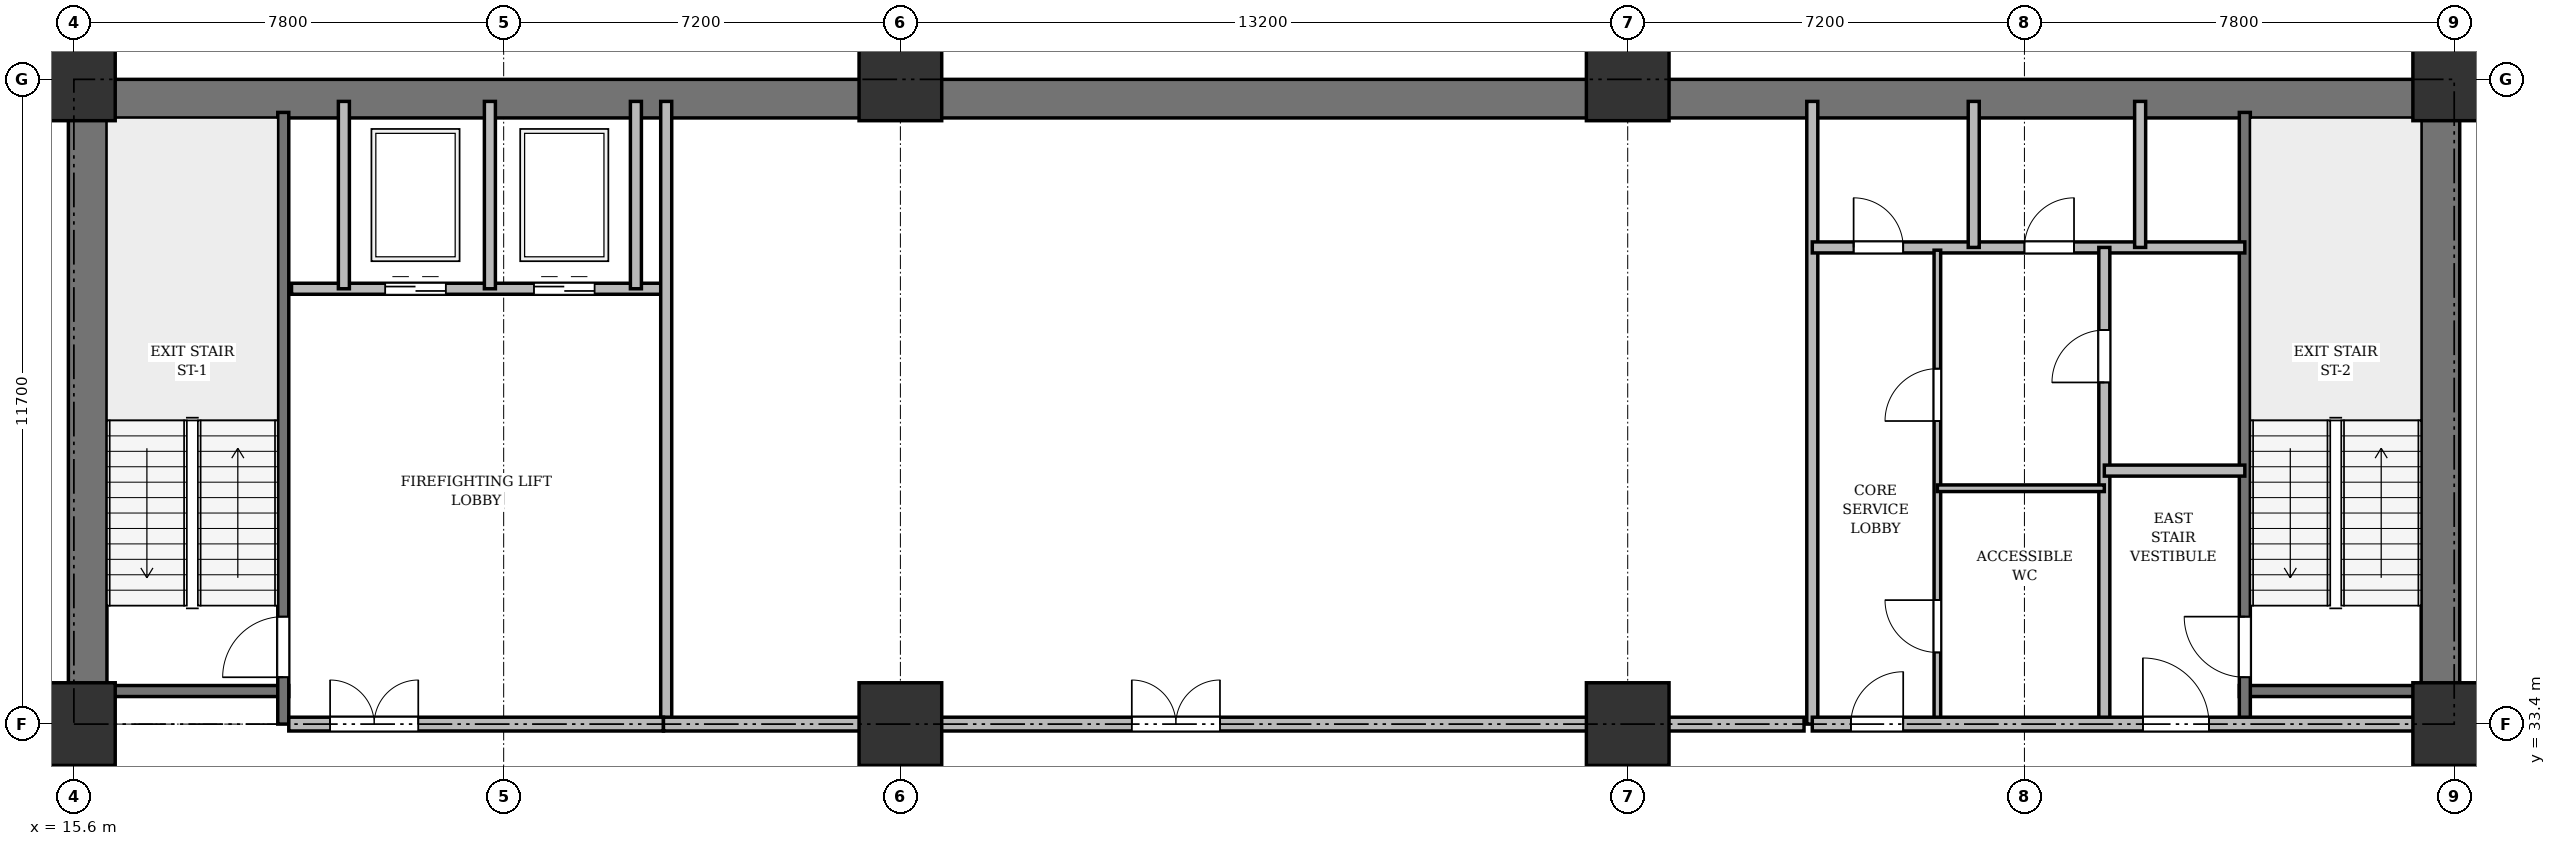
"""IFC4 building model, lengths in metres.
Left out: names, types, materials, properties, quantities, classifications, styles, units other than length and angle.
Written with IfcOpenShell. Run it as: python <this file> out.ifc"""

import sys

from ifc_helpers import new_model, si_unit, direction, frame, frame_2d, origin, origin_2d, place, context, subcontext, project, spatial, rectangle, extrude, source, transform, mapped, element, fill, save


model = new_model("IFC4")
c1 = context("Model", 3, precision=1e-05, world=origin(), true_north=direction((0.0, 1.0)))
c2 = subcontext(c1, "Body", "Model", "MODEL_VIEW")
j1 = project(units=[si_unit("LENGTHUNIT", "METRE"), si_unit("PLANEANGLEUNIT", "RADIAN")], contexts=[c1])
p1 = place(None, origin())
s1 = spatial("IfcSite", under=j1, at=p1, CompositionType="ELEMENT")
p2 = place(p1, origin())
s2 = spatial("IfcBuilding", under=s1, at=p2, CompositionType="ELEMENT")
p3 = place(p2, frame((0.0, 0.0, -13.2)))
s3 = spatial("IfcBuildingStorey", under=s2, at=p3, CompositionType="ELEMENT", Elevation=-13.2)
m1 = source(origin(), c2, "Body", "SweptSolid", [
    extrude(rectangle(XDim=1.5, YDim=1.5, at=origin_2d()), origin(), (0.0, 0.0, 1.0), 4.6),
])
for number, where, z_axis, x_axis in (
    (1, (15.6, 33.4, 0.0), (0.0, 0.0, 1.0), (1.0, 0.0, 0.0)),
    (2, (15.6, 45.1, 0.0), (0.0, 0.0, 1.0), (1.0, 0.0, 0.0)),
    (3, (30.6, 33.4, 0.0), (0.0, 0.0, 1.0), (1.0, 0.0, 0.0)),
    (4, (30.6, 45.1, 0.0), (0.0, 0.0, 1.0), (1.0, 0.0, 0.0)),
    (5, (43.8, 33.4, 0.0), (0.0, 0.0, 1.0), (1.0, 0.0, 0.0)),
    (6, (43.8, 45.1, 0.0), (0.0, 0.0, 1.0), (1.0, 0.0, 0.0)),
    (7, (58.8, 33.4, 0.0), (0.0, 0.0, 1.0), (1.0, 0.0, 0.0)),
    (8, (58.8, 45.1, 0.0), (0.0, 0.0, 1.0), (1.0, 0.0, 0.0)),
):
    element("IfcColumn", number, at=place(p3, frame(where, z_axis=z_axis, x_axis=x_axis)), inside=s3, PredefinedType="COLUMN", context=c2, shape_type="MappedRepresentation", body=[
        mapped(m1, transform((0.0, 0.0, 0.0), x_axis=(1.0, 0.0, 0.0), y_axis=(0.0, 1.0, 0.0), z_axis=(0.0, 0.0, 1.0), scale=1.0)),
    ])
p4 = place(p3, frame((15.5, 44.75, 0.0), z_axis=(0.0, 0.0, 1.0), x_axis=(1.0, 0.0, 0.0)))
e9 = element("IfcWall", 9, at=p4, inside=s3, PredefinedType="SHEAR", context=c2, shape_type="SweptSolid", body=[
    extrude(rectangle(XDim=43.4, YDim=0.7, at=frame_2d((21.7, 0.0))), origin(), (0.0, 0.0, 1.0), 4.28),
])
for number, where, z_axis, x_axis in (
    (10, (15.85, 33.4, 0.0), (0.0, 0.0, 1.0), (0.0, 1.0, 0.0)),
    (11, (58.55, 33.4, 0.0), (0.0, 0.0, 1.0), (0.0, 1.0, 0.0)),
):
    element("IfcWall", number, at=place(p3, frame(where, z_axis=z_axis, x_axis=x_axis)), inside=s3, PredefinedType="SHEAR", context=c2, shape_type="SweptSolid", body=[
        extrude(rectangle(XDim=11.7, YDim=0.7, at=frame_2d((5.85, 0.0))), origin(), (0.0, 0.0, 1.0), 4.28),
    ])
p5 = place(p3, frame((16.1, 34.0, 0.0), z_axis=(0.0, 0.0, 1.0), x_axis=(1.0, 0.0, 0.0)))
e12 = element("IfcWall", 12, at=p5, inside=s3, PredefinedType="SHEAR", context=c2, shape_type="SweptSolid", body=[
    extrude(rectangle(XDim=3.4, YDim=0.2, at=frame_2d((1.7, 0.0))), origin(), (0.0, 0.0, 1.0), 4.28),
])
p6 = place(p3, frame((19.4, 33.4, 0.0), z_axis=(0.0, 0.0, 1.0), x_axis=(0.0, 1.0, 0.0)))
e13 = element("IfcWall", 13, at=p6, inside=s3, PredefinedType="SHEAR", context=c2, shape_type="SweptSolid", body=[
    extrude(rectangle(XDim=11.1, YDim=0.2, at=frame_2d((5.55, 0.0))), origin(), (0.0, 0.0, 1.0), 4.28),
])
p7 = place(p6, frame((0.85, 0.0, 0.0)))
e14 = element("IfcOpeningElement", 14, at=p7, cuts=e13, PredefinedType="OPENING", context=c2, shape_type="SweptSolid", body=[
    extrude(rectangle(XDim=1.1, YDim=2.15, at=frame_2d((0.55, 1.075))), frame((0.0, 0.11, 0.0), z_axis=(0.0, -1.0, 0.0), x_axis=(1.0, 0.0, 0.0)), (0.0, 0.0, 1.0), 0.22),
])
p8 = place(p3, frame((54.9, 34.0, 0.0), z_axis=(0.0, 0.0, 1.0), x_axis=(1.0, 0.0, 0.0)))
e15 = element("IfcWall", 15, at=p8, inside=s3, PredefinedType="SHEAR", context=c2, shape_type="SweptSolid", body=[
    extrude(rectangle(XDim=3.4, YDim=0.2, at=frame_2d((1.7, 0.0))), origin(), (0.0, 0.0, 1.0), 4.28),
])
p9 = place(p3, frame((55.0, 33.4, 0.0), z_axis=(0.0, 0.0, 1.0), x_axis=(0.0, 1.0, 0.0)))
e16 = element("IfcWall", 16, at=p9, inside=s3, PredefinedType="SHEAR", context=c2, shape_type="SweptSolid", body=[
    extrude(rectangle(XDim=11.1, YDim=0.2, at=frame_2d((5.55, 0.0))), origin(), (0.0, 0.0, 1.0), 4.28),
])
p10 = place(p9, frame((0.85, 0.0, 0.0)))
e17 = element("IfcOpeningElement", 17, at=p10, cuts=e16, PredefinedType="OPENING", context=c2, shape_type="SweptSolid", body=[
    extrude(rectangle(XDim=1.1, YDim=2.15, at=frame_2d((0.55, 1.075))), frame((0.0, 0.11, 0.0), z_axis=(0.0, -1.0, 0.0), x_axis=(1.0, 0.0, 0.0)), (0.0, 0.0, 1.0), 0.22),
])
p11 = place(p3, frame((19.55, 41.3, 0.0), z_axis=(0.0, 0.0, 1.0), x_axis=(1.0, 0.0, 0.0)))
e18 = element("IfcWall", 18, at=p11, inside=s3, PredefinedType="SOLIDWALL", context=c2, shape_type="SweptSolid", body=[
    extrude(rectangle(XDim=6.75, YDim=0.2, at=frame_2d((3.375, 0.0))), origin(), (0.0, 0.0, 1.0), 4.28),
])
p12 = place(p11, frame((1.7, 0.0, 0.0)))
e19 = element("IfcOpeningElement", 19, at=p12, cuts=e18, PredefinedType="OPENING", context=c2, shape_type="SweptSolid", body=[
    extrude(rectangle(XDim=1.1, YDim=2.15, at=frame_2d((0.55, 1.075))), frame((0.0, 0.11, 0.0), z_axis=(0.0, -1.0, 0.0), x_axis=(1.0, 0.0, 0.0)), (0.0, 0.0, 1.0), 0.22),
])
p13 = place(p11, frame((4.4, 0.0, 0.0)))
e20 = element("IfcOpeningElement", 20, at=p13, cuts=e18, PredefinedType="OPENING", context=c2, shape_type="SweptSolid", body=[
    extrude(rectangle(XDim=1.1, YDim=2.15, at=frame_2d((0.55, 1.075))), frame((0.0, 0.11, 0.0), z_axis=(0.0, -1.0, 0.0), x_axis=(1.0, 0.0, 0.0)), (0.0, 0.0, 1.0), 0.22),
])
for number, where, z_axis, x_axis in (
    (21, (20.5, 41.3, 0.0), (0.0, 0.0, 1.0), (0.0, 1.0, 0.0)),
    (22, (23.15, 41.3, 0.0), (0.0, 0.0, 1.0), (0.0, 1.0, 0.0)),
    (23, (25.8, 41.3, 0.0), (0.0, 0.0, 1.0), (0.0, 1.0, 0.0)),
):
    element("IfcWall", number, at=place(p3, frame(where, z_axis=z_axis, x_axis=x_axis)), inside=s3, PredefinedType="SOLIDWALL", context=c2, shape_type="SweptSolid", body=[
        extrude(rectangle(XDim=3.4, YDim=0.2, at=frame_2d((1.7, 0.0))), origin(), (0.0, 0.0, 1.0), 4.28),
    ])
p14 = place(p3, frame((26.35, 33.4, 0.0), z_axis=(0.0, 0.0, 1.0), x_axis=(0.0, 1.0, 0.0)))
e24 = element("IfcWall", 24, at=p14, inside=s3, PredefinedType="SOLIDWALL", context=c2, shape_type="SweptSolid", body=[
    extrude(rectangle(XDim=11.3, YDim=0.2, at=frame_2d((5.65, 0.0))), origin(), (0.0, 0.0, 1.0), 3.38),
])
p15 = place(p3, frame((19.5, 33.4, 0.0), z_axis=(0.0, 0.0, 1.0), x_axis=(1.0, 0.0, 0.0)))
e25 = element("IfcWall", 25, at=p15, inside=s3, PredefinedType="PARTITIONING", context=c2, shape_type="SweptSolid", body=[
    extrude(rectangle(XDim=6.8, YDim=0.25, at=frame_2d((3.4, 0.0))), origin(), (0.0, 0.0, 1.0), 3.38),
])
p16 = place(p15, frame((0.75, 0.0, 0.0)))
e26 = element("IfcOpeningElement", 26, at=p16, cuts=e25, PredefinedType="OPENING", context=c2, shape_type="SweptSolid", body=[
    extrude(rectangle(XDim=1.6, YDim=2.2, at=frame_2d((0.8, 1.1))), frame((0.0, 0.135, 0.0), z_axis=(0.0, -1.0, 0.0), x_axis=(1.0, 0.0, 0.0)), (0.0, 0.0, 1.0), 0.27),
])
p17 = place(p3, frame((47.15, 33.4, 0.0), z_axis=(0.0, 0.0, 1.0), x_axis=(0.0, 1.0, 0.0)))
e27 = element("IfcWall", 27, at=p17, inside=s3, PredefinedType="SOLIDWALL", context=c2, shape_type="SweptSolid", body=[
    extrude(rectangle(XDim=11.3, YDim=0.2, at=frame_2d((5.65, 0.0))), origin(), (0.0, 0.0, 1.0), 3.38),
])
p18 = place(p3, frame((26.3, 33.4, 0.0), z_axis=(0.0, 0.0, 1.0), x_axis=(1.0, 0.0, 0.0)))
e28 = element("IfcWall", 28, at=p18, inside=s3, PredefinedType="PARTITIONING", context=c2, shape_type="SweptSolid", body=[
    extrude(rectangle(XDim=20.7, YDim=0.25, at=frame_2d((10.35, 0.0))), origin(), (0.0, 0.0, 1.0), 3.38),
])
p19 = place(p18, frame((8.5, 0.0, 0.0)))
e29 = element("IfcOpeningElement", 29, at=p19, cuts=e28, PredefinedType="OPENING", context=c2, shape_type="SweptSolid", body=[
    extrude(rectangle(XDim=1.6, YDim=2.2, at=frame_2d((0.8, 1.1))), frame((0.0, 0.135, 0.0), z_axis=(0.0, -1.0, 0.0), x_axis=(1.0, 0.0, 0.0)), (0.0, 0.0, 1.0), 0.27),
])
p20 = place(p3, frame((47.15, 42.05, 0.0), z_axis=(0.0, 0.0, 1.0), x_axis=(1.0, 0.0, 0.0)))
e30 = element("IfcWall", 30, at=p20, inside=s3, PredefinedType="SOLIDWALL", context=c2, shape_type="SweptSolid", body=[
    extrude(rectangle(XDim=7.85, YDim=0.2, at=frame_2d((3.925, 0.0))), origin(), (0.0, 0.0, 1.0), 4.28),
])
p21 = place(p20, frame((0.75, 0.0, 0.0)))
e31 = element("IfcOpeningElement", 31, at=p21, cuts=e30, PredefinedType="OPENING", context=c2, shape_type="SweptSolid", body=[
    extrude(rectangle(XDim=0.9, YDim=2.1, at=frame_2d((0.45, 1.05))), frame((0.0, 0.11, 0.0), z_axis=(0.0, -1.0, 0.0), x_axis=(1.0, 0.0, 0.0)), (0.0, 0.0, 1.0), 0.22),
])
p22 = place(p20, frame((3.85, 0.0, 0.0)))
e32 = element("IfcOpeningElement", 32, at=p22, cuts=e30, PredefinedType="OPENING", context=c2, shape_type="SweptSolid", body=[
    extrude(rectangle(XDim=0.9, YDim=2.1, at=frame_2d((0.45, 1.05))), frame((0.0, 0.11, 0.0), z_axis=(0.0, -1.0, 0.0), x_axis=(1.0, 0.0, 0.0)), (0.0, 0.0, 1.0), 0.22),
])
for number, where, z_axis, x_axis in (
    (33, (50.08, 42.05, 0.0), (0.0, 0.0, 1.0), (0.0, 1.0, 0.0)),
    (34, (53.1, 42.05, 0.0), (0.0, 0.0, 1.0), (0.0, 1.0, 0.0)),
):
    element("IfcWall", number, at=place(p3, frame(where, z_axis=z_axis, x_axis=x_axis)), inside=s3, PredefinedType="SOLIDWALL", context=c2, shape_type="SweptSolid", body=[
        extrude(rectangle(XDim=2.65, YDim=0.2, at=frame_2d((1.325, 0.0))), origin(), (0.0, 0.0, 1.0), 4.28),
    ])
p23 = place(p3, frame((52.45, 33.4, 0.0), z_axis=(0.0, 0.0, 1.0), x_axis=(0.0, 1.0, 0.0)))
e35 = element("IfcWall", 35, at=p23, inside=s3, PredefinedType="PARTITIONING", context=c2, shape_type="SweptSolid", body=[
    extrude(rectangle(XDim=8.65, YDim=0.2, at=frame_2d((4.325, 0.0))), origin(), (0.0, 0.0, 1.0), 3.38),
])
p24 = place(p23, frame((6.2, 0.0, 0.0)))
e36 = element("IfcOpeningElement", 36, at=p24, cuts=e35, PredefinedType="OPENING", context=c2, shape_type="SweptSolid", body=[
    extrude(rectangle(XDim=0.95, YDim=2.15, at=frame_2d((0.475, 1.075))), frame((0.0, 0.11, 0.0), z_axis=(0.0, -1.0, 0.0), x_axis=(1.0, 0.0, 0.0)), (0.0, 0.0, 1.0), 0.22),
])
p25 = place(p3, frame((52.45, 38.0, 0.0), z_axis=(0.0, 0.0, 1.0), x_axis=(1.0, 0.0, 0.0)))
e37 = element("IfcWall", 37, at=p25, inside=s3, PredefinedType="PARTITIONING", context=c2, shape_type="SweptSolid", body=[
    extrude(rectangle(XDim=2.55, YDim=0.2, at=frame_2d((1.275, 0.0))), origin(), (0.0, 0.0, 1.0), 4.28),
])
p26 = place(p3, frame((49.42, 33.4, 0.0), z_axis=(0.0, 0.0, 1.0), x_axis=(0.0, 1.0, 0.0)))
e38 = element("IfcWall", 38, at=p26, inside=s3, PredefinedType="PARTITIONING", context=c2, shape_type="SweptSolid", body=[
    extrude(rectangle(XDim=8.6, YDim=0.12, at=frame_2d((4.3, 0.0))), origin(), (0.0, 0.0, 1.0), 3.38),
])
p27 = place(p26, frame((1.3, 0.0, 0.0)))
e39 = element("IfcOpeningElement", 39, at=p27, cuts=e38, PredefinedType="OPENING", context=c2, shape_type="SweptSolid", body=[
    extrude(rectangle(XDim=0.95, YDim=2.15, at=frame_2d((0.475, 1.075))), frame((0.0, 0.07, 0.0), z_axis=(0.0, -1.0, 0.0), x_axis=(1.0, 0.0, 0.0)), (0.0, 0.0, 1.0), 0.14),
])
p28 = place(p26, frame((5.5, 0.0, 0.0)))
e40 = element("IfcOpeningElement", 40, at=p28, cuts=e38, PredefinedType="OPENING", context=c2, shape_type="SweptSolid", body=[
    extrude(rectangle(XDim=0.95, YDim=2.15, at=frame_2d((0.475, 1.075))), frame((0.0, 0.07, 0.0), z_axis=(0.0, -1.0, 0.0), x_axis=(1.0, 0.0, 0.0)), (0.0, 0.0, 1.0), 0.14),
])
p29 = place(p3, frame((49.42, 37.68, 0.0), z_axis=(0.0, 0.0, 1.0), x_axis=(1.0, 0.0, 0.0)))
e41 = element("IfcWall", 41, at=p29, inside=s3, PredefinedType="PARTITIONING", context=c2, shape_type="SweptSolid", body=[
    extrude(rectangle(XDim=3.03, YDim=0.12, at=frame_2d((1.515, 0.0))), origin(), (0.0, 0.0, 1.0), 4.28),
])
p30 = place(p3, frame((47.15, 33.4, 0.0), z_axis=(0.0, 0.0, 1.0), x_axis=(1.0, 0.0, 0.0)))
e42 = element("IfcWall", 42, at=p30, inside=s3, PredefinedType="PARTITIONING", context=c2, shape_type="SweptSolid", body=[
    extrude(rectangle(XDim=11.15, YDim=0.25, at=frame_2d((5.575, 0.0))), origin(), (0.0, 0.0, 1.0), 3.38),
])
p31 = place(p30, frame((0.7, 0.0, 0.0)))
e43 = element("IfcOpeningElement", 43, at=p31, cuts=e42, PredefinedType="OPENING", context=c2, shape_type="SweptSolid", body=[
    extrude(rectangle(XDim=0.95, YDim=2.15, at=frame_2d((0.475, 1.075))), frame((0.0, 0.135, 0.0), z_axis=(0.0, -1.0, 0.0), x_axis=(1.0, 0.0, 0.0)), (0.0, 0.0, 1.0), 0.27),
])
p32 = place(p30, frame((6.0, 0.0, 0.0)))
e44 = element("IfcOpeningElement", 44, at=p32, cuts=e42, PredefinedType="OPENING", context=c2, shape_type="SweptSolid", body=[
    extrude(rectangle(XDim=1.2, YDim=2.15, at=frame_2d((0.6, 1.075))), frame((0.0, 0.135, 0.0), z_axis=(0.0, -1.0, 0.0), x_axis=(1.0, 0.0, 0.0)), (0.0, 0.0, 1.0), 0.27),
])
m2 = source(origin(), c2, "Body", "SweptSolid", [
    extrude(rectangle(XDim=1.1, YDim=2.15, at=frame_2d((0.55, 1.075))), frame((0.0, 0.025, 0.0), z_axis=(0.0, -1.0, 0.0), x_axis=(1.0, 0.0, 0.0)), (0.0, 0.0, 1.0), 0.05),
])
p33 = place(p7, origin())
e45 = element("IfcDoor", 45, at=p33, inside=s3, OperationType="SINGLE_SWING_LEFT", PredefinedType="DOOR", context=c2, shape_type="MappedRepresentation", body=[
    mapped(m2, transform((0.0, 0.0, 0.0), x_axis=(1.0, 0.0, 0.0), y_axis=(0.0, 1.0, 0.0), z_axis=(0.0, 0.0, 1.0), scale=1.0)),
])
fill(e14, e45)
p34 = place(p10, origin())
e46 = element("IfcDoor", 46, at=p34, inside=s3, OperationType="SINGLE_SWING_RIGHT", PredefinedType="DOOR", context=c2, shape_type="MappedRepresentation", body=[
    mapped(m2, transform((0.0, 0.0, 0.0), x_axis=(1.0, 0.0, 0.0), y_axis=(0.0, 1.0, 0.0), z_axis=(0.0, 0.0, 1.0), scale=1.0)),
])
fill(e17, e46)
p35 = place(p12, origin())
e47 = element("IfcDoor", 47, at=p35, inside=s3, OperationType="DOUBLE_DOOR_SLIDING", PredefinedType="DOOR", context=c2, shape_type="MappedRepresentation", body=[
    mapped(m2, transform((0.0, 0.0, 0.0), x_axis=(1.0, 0.0, 0.0), y_axis=(0.0, 1.0, 0.0), z_axis=(0.0, 0.0, 1.0), scale=1.0)),
])
fill(e19, e47)
p36 = place(p13, origin())
e48 = element("IfcDoor", 48, at=p36, inside=s3, OperationType="DOUBLE_DOOR_SLIDING", PredefinedType="DOOR", context=c2, shape_type="MappedRepresentation", body=[
    mapped(m2, transform((0.0, 0.0, 0.0), x_axis=(1.0, 0.0, 0.0), y_axis=(0.0, 1.0, 0.0), z_axis=(0.0, 0.0, 1.0), scale=1.0)),
])
fill(e20, e48)
m3 = source(origin(), c2, "Body", "SweptSolid", [
    extrude(rectangle(XDim=1.6, YDim=2.2, at=frame_2d((0.8, 1.1))), frame((0.0, 0.025, 0.0), z_axis=(0.0, -1.0, 0.0), x_axis=(1.0, 0.0, 0.0)), (0.0, 0.0, 1.0), 0.05),
])
p37 = place(p16, origin())
e49 = element("IfcDoor", 49, at=p37, inside=s3, OperationType="DOUBLE_DOOR_SINGLE_SWING", PredefinedType="DOOR", context=c2, shape_type="MappedRepresentation", body=[
    mapped(m3, transform((0.0, 0.0, 0.0), x_axis=(1.0, 0.0, 0.0), y_axis=(0.0, 1.0, 0.0), z_axis=(0.0, 0.0, 1.0), scale=1.0)),
])
fill(e26, e49)
p38 = place(p19, origin())
e50 = element("IfcDoor", 50, at=p38, inside=s3, OperationType="DOUBLE_DOOR_SINGLE_SWING", PredefinedType="DOOR", context=c2, shape_type="MappedRepresentation", body=[
    mapped(m3, transform((0.0, 0.0, 0.0), x_axis=(1.0, 0.0, 0.0), y_axis=(0.0, 1.0, 0.0), z_axis=(0.0, 0.0, 1.0), scale=1.0)),
])
fill(e29, e50)
m4 = source(origin(), c2, "Body", "SweptSolid", [
    extrude(rectangle(XDim=0.9, YDim=2.1, at=frame_2d((0.45, 1.05))), frame((0.0, 0.025, 0.0), z_axis=(0.0, -1.0, 0.0), x_axis=(1.0, 0.0, 0.0)), (0.0, 0.0, 1.0), 0.05),
])
p39 = place(p21, origin())
e51 = element("IfcDoor", 51, at=p39, inside=s3, OperationType="SINGLE_SWING_LEFT", PredefinedType="DOOR", context=c2, shape_type="MappedRepresentation", body=[
    mapped(m4, transform((0.0, 0.0, 0.0), x_axis=(1.0, 0.0, 0.0), y_axis=(0.0, 1.0, 0.0), z_axis=(0.0, 0.0, 1.0), scale=1.0)),
])
fill(e31, e51)
p40 = place(p22, origin())
e52 = element("IfcDoor", 52, at=p40, inside=s3, OperationType="SINGLE_SWING_RIGHT", PredefinedType="DOOR", context=c2, shape_type="MappedRepresentation", body=[
    mapped(m4, transform((0.0, 0.0, 0.0), x_axis=(1.0, 0.0, 0.0), y_axis=(0.0, 1.0, 0.0), z_axis=(0.0, 0.0, 1.0), scale=1.0)),
])
fill(e32, e52)
m5 = source(origin(), c2, "Body", "SweptSolid", [
    extrude(rectangle(XDim=0.95, YDim=2.15, at=frame_2d((0.475, 1.075))), frame((0.0, 0.025, 0.0), z_axis=(0.0, -1.0, 0.0), x_axis=(1.0, 0.0, 0.0)), (0.0, 0.0, 1.0), 0.05),
])
p41 = place(p24, origin())
e53 = element("IfcDoor", 53, at=p41, inside=s3, OperationType="SINGLE_SWING_LEFT", PredefinedType="DOOR", context=c2, shape_type="MappedRepresentation", body=[
    mapped(m5, transform((0.0, 0.0, 0.0), x_axis=(1.0, 0.0, 0.0), y_axis=(0.0, 1.0, 0.0), z_axis=(0.0, 0.0, 1.0), scale=1.0)),
])
fill(e36, e53)
p42 = place(p27, origin())
e54 = element("IfcDoor", 54, at=p42, inside=s3, OperationType="SINGLE_SWING_RIGHT", PredefinedType="DOOR", context=c2, shape_type="MappedRepresentation", body=[
    mapped(m5, transform((0.0, 0.0, 0.0), x_axis=(1.0, 0.0, 0.0), y_axis=(0.0, 1.0, 0.0), z_axis=(0.0, 0.0, 1.0), scale=1.0)),
])
fill(e39, e54)
p43 = place(p28, origin())
e55 = element("IfcDoor", 55, at=p43, inside=s3, OperationType="SINGLE_SWING_LEFT", PredefinedType="DOOR", context=c2, shape_type="MappedRepresentation", body=[
    mapped(m5, transform((0.0, 0.0, 0.0), x_axis=(1.0, 0.0, 0.0), y_axis=(0.0, 1.0, 0.0), z_axis=(0.0, 0.0, 1.0), scale=1.0)),
])
fill(e40, e55)
p44 = place(p31, origin())
e56 = element("IfcDoor", 56, at=p44, inside=s3, OperationType="SINGLE_SWING_RIGHT", PredefinedType="DOOR", context=c2, shape_type="MappedRepresentation", body=[
    mapped(m5, transform((0.0, 0.0, 0.0), x_axis=(1.0, 0.0, 0.0), y_axis=(0.0, 1.0, 0.0), z_axis=(0.0, 0.0, 1.0), scale=1.0)),
])
fill(e43, e56)
m6 = source(origin(), c2, "Body", "SweptSolid", [
    extrude(rectangle(XDim=1.2, YDim=2.15, at=frame_2d((0.6, 1.075))), frame((0.0, 0.025, 0.0), z_axis=(0.0, -1.0, 0.0), x_axis=(1.0, 0.0, 0.0)), (0.0, 0.0, 1.0), 0.05),
])
p45 = place(p32, origin())
e57 = element("IfcDoor", 57, at=p45, inside=s3, OperationType="SINGLE_SWING_LEFT", PredefinedType="DOOR", context=c2, shape_type="MappedRepresentation", body=[
    mapped(m6, transform((0.0, 0.0, 0.0), x_axis=(1.0, 0.0, 0.0), y_axis=(0.0, 1.0, 0.0), z_axis=(0.0, 0.0, 1.0), scale=1.0)),
])
fill(e44, e57)
save(model, sys.argv[1])
